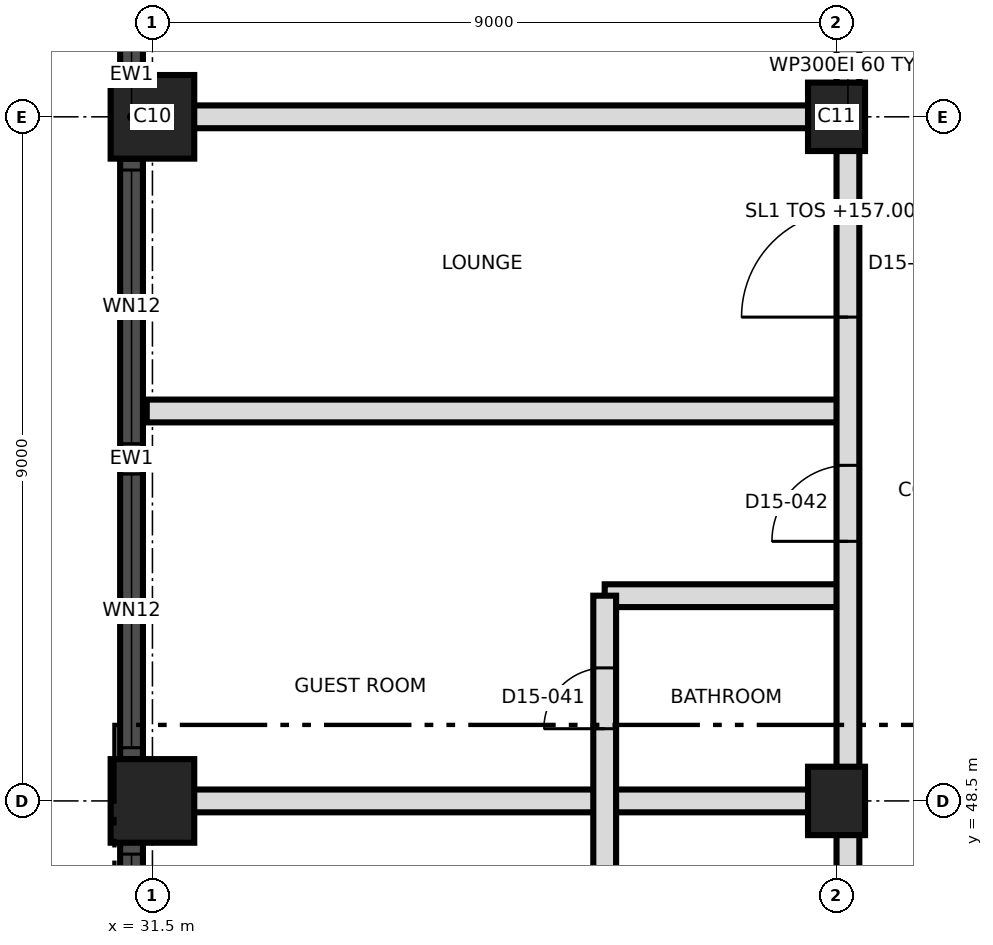
"""IFC4 building model, lengths in metres.
Left out: names, types, materials, properties, quantities, classifications, styles, units other than length and angle.
Written with IfcOpenShell. Run it as: python <this file> out.ifc"""

import sys

from ifc_helpers import new_model, si_unit, direction, frame, frame_2d, origin, origin_2d, place, context, subcontext, project, spatial, rectangle, extrude, element, fill, save


model = new_model("IFC4")
c1 = context("Model", 3, precision=1e-05, world=origin(), true_north=direction((0.0, 1.0)))
c2 = subcontext(c1, "Body", "Model", "MODEL_VIEW")
j1 = project(units=[si_unit("LENGTHUNIT", "METRE"), si_unit("PLANEANGLEUNIT", "RADIAN")], contexts=[c1])
p1 = place(None, origin())
s1 = spatial("IfcSite", under=j1, at=p1, CompositionType="ELEMENT")
p2 = place(p1, origin())
s2 = spatial("IfcBuilding", under=s1, at=p2, CompositionType="ELEMENT")
p3 = place(p2, frame((0.0, 0.0, 157.0)))
s3 = spatial("IfcBuildingStorey", under=s2, at=p3, CompositionType="ELEMENT", Elevation=157.0)
p4 = place(p3, frame((31.5, 48.5, 0.0), z_axis=(0.0, 0.0, 1.0), x_axis=(1.0, 0.0, 0.0)))
e1 = element("IfcColumn", 1, at=p4, inside=s3, PredefinedType="COLUMN", context=c2, shape_type="SweptSolid", body=[
    extrude(rectangle(XDim=1.1, YDim=1.1, at=origin_2d()), origin(), (0.0, 0.0, 1.0), 3.7),
])
p5 = place(p3, frame((40.5, 48.5, 0.0), z_axis=(0.0, 0.0, 1.0), x_axis=(0.0, 1.0, 0.0)))
e2 = element("IfcColumn", 2, at=p5, inside=s3, PredefinedType="COLUMN", context=c2, shape_type="SweptSolid", body=[
    extrude(rectangle(XDim=0.9, YDim=0.75, at=origin_2d()), origin(), (0.0, 0.0, 1.0), 3.7),
])
p6 = place(p3, frame((31.5, 57.5, 0.0), z_axis=(0.0, 0.0, 1.0), x_axis=(1.0, 0.0, 0.0)))
e3 = element("IfcColumn", 3, at=p6, inside=s3, PredefinedType="COLUMN", context=c2, shape_type="SweptSolid", body=[
    extrude(rectangle(XDim=1.1, YDim=1.1, at=origin_2d()), origin(), (0.0, 0.0, 1.0), 3.7),
])
p7 = place(p3, frame((40.5, 57.5, 0.0), z_axis=(0.0, 0.0, 1.0), x_axis=(0.0, 1.0, 0.0)))
e4 = element("IfcColumn", 4, at=p7, inside=s3, PredefinedType="COLUMN", context=c2, shape_type="SweptSolid", body=[
    extrude(rectangle(XDim=0.9, YDim=0.75, at=origin_2d()), origin(), (0.0, 0.0, 1.0), 3.7),
])
p8 = place(p3, frame((31.225, 65.95, 0.0), z_axis=(0.0, 0.0, 1.0), x_axis=(0.0, -1.0, 0.0)))
e5 = element("IfcWall", 5, at=p8, inside=s3, PredefinedType="SOLIDWALL", context=c2, shape_type="SweptSolid", body=[
    extrude(rectangle(XDim=7.9, YDim=0.3, at=frame_2d((3.95, 0.0))), origin(), (0.0, 0.0, 1.0), 2.8),
])
p9 = place(p8, frame((4.15, 0.0, 0.9)))
e6 = element("IfcOpeningElement", 6, at=p9, cuts=e5, PredefinedType="OPENING", context=c2, shape_type="SweptSolid", body=[
    extrude(rectangle(XDim=3.6, YDim=1.5, at=frame_2d((1.8, 0.75))), frame((0.0, 0.16, 0.0), z_axis=(0.0, -1.0, 0.0), x_axis=(1.0, 0.0, 0.0)), (0.0, 0.0, 1.0), 0.32),
])
p10 = place(p3, frame((31.225, 58.05, 0.0), z_axis=(0.0, 0.0, 1.0), x_axis=(0.0, -1.0, 0.0)))
e7 = element("IfcWall", 7, at=p10, inside=s3, PredefinedType="SOLIDWALL", context=c2, shape_type="SweptSolid", body=[
    extrude(rectangle(XDim=1.1, YDim=0.3, at=frame_2d((0.55, 0.0))), origin(), (0.0, 0.0, 1.0), 3.4),
])
p11 = place(p3, frame((31.225, 56.95, 0.0), z_axis=(0.0, 0.0, 1.0), x_axis=(0.0, -1.0, 0.0)))
e8 = element("IfcWall", 8, at=p11, inside=s3, PredefinedType="SOLIDWALL", context=c2, shape_type="SweptSolid", body=[
    extrude(rectangle(XDim=7.9, YDim=0.3, at=frame_2d((3.95, 0.0))), origin(), (0.0, 0.0, 1.0), 2.8),
])
p12 = place(p11, frame((0.15, 0.0, 0.9)))
e9 = element("IfcOpeningElement", 9, at=p12, cuts=e8, PredefinedType="OPENING", context=c2, shape_type="SweptSolid", body=[
    extrude(rectangle(XDim=3.6, YDim=1.5, at=frame_2d((1.8, 0.75))), frame((0.0, 0.16, 0.0), z_axis=(0.0, -1.0, 0.0), x_axis=(1.0, 0.0, 0.0)), (0.0, 0.0, 1.0), 0.32),
])
p13 = place(p11, frame((4.15, 0.0, 0.9)))
e10 = element("IfcOpeningElement", 10, at=p13, cuts=e8, PredefinedType="OPENING", context=c2, shape_type="SweptSolid", body=[
    extrude(rectangle(XDim=3.6, YDim=1.5, at=frame_2d((1.8, 0.75))), frame((0.0, 0.16, 0.0), z_axis=(0.0, -1.0, 0.0), x_axis=(1.0, 0.0, 0.0)), (0.0, 0.0, 1.0), 0.32),
])
p14 = place(p3, frame((31.225, 49.05, 0.0), z_axis=(0.0, 0.0, 1.0), x_axis=(0.0, -1.0, 0.0)))
e11 = element("IfcWall", 11, at=p14, inside=s3, PredefinedType="SOLIDWALL", context=c2, shape_type="SweptSolid", body=[
    extrude(rectangle(XDim=8.87, YDim=0.3, at=frame_2d((4.435, 0.0))), origin(), (0.0, 0.0, 1.0), 3.4),
])
p15 = place(p14, frame((1.25, 0.0, 0.9)))
e12 = element("IfcOpeningElement", 12, at=p15, cuts=e11, PredefinedType="OPENING", context=c2, shape_type="SweptSolid", body=[
    extrude(rectangle(XDim=3.6, YDim=1.5, at=frame_2d((1.8, 0.75))), frame((0.0, 0.16, 0.0), z_axis=(0.0, -1.0, 0.0), x_axis=(1.0, 0.0, 0.0)), (0.0, 0.0, 1.0), 0.32),
])
p16 = place(p14, frame((6.06, 0.0, 0.3)))
e13 = element("IfcOpeningElement", 13, at=p16, cuts=e11, PredefinedType="OPENING", context=c2, shape_type="SweptSolid", body=[
    extrude(rectangle(XDim=1.8, YDim=2.4, at=frame_2d((0.9, 1.2))), frame((0.0, 0.16, 0.0), z_axis=(0.0, -1.0, 0.0), x_axis=(1.0, 0.0, 0.0)), (0.0, 0.0, 1.0), 0.32),
])
p17 = place(p3, frame((31.425, 48.5, 0.0), z_axis=(0.0, 0.0, 1.0), x_axis=(1.0, 0.0, 0.0)))
e14 = element("IfcWall", 14, at=p17, inside=s3, PredefinedType="PARTITIONING", context=c2, shape_type="SweptSolid", body=[
    extrude(rectangle(XDim=9.225, YDim=0.3, at=frame_2d((4.612, 0.0))), origin(), (0.0, 0.0, 1.0), 3.4),
])
p18 = place(p3, frame((37.45, 51.2, 0.0), z_axis=(0.0, 0.0, 1.0), x_axis=(1.0, 0.0, 0.0)))
e15 = element("IfcWall", 15, at=p18, inside=s3, PredefinedType="PARTITIONING", context=c2, shape_type="SweptSolid", body=[
    extrude(rectangle(XDim=3.2, YDim=0.3, at=frame_2d((1.6, 0.0))), origin(), (0.0, 0.0, 1.0), 3.4),
])
for number, where, z_axis, x_axis in (
    (16, (31.425, 53.63, 0.0), (0.0, 0.0, 1.0), (1.0, 0.0, 0.0)),
    (17, (31.425, 57.5, 0.0), (0.0, 0.0, 1.0), (1.0, 0.0, 0.0)),
):
    element("IfcWall", number, at=place(p3, frame(where, z_axis=z_axis, x_axis=x_axis)), inside=s3, PredefinedType="PARTITIONING", context=c2, shape_type="SweptSolid", body=[
        extrude(rectangle(XDim=9.225, YDim=0.3, at=frame_2d((4.612, 0.0))), origin(), (0.0, 0.0, 1.0), 3.4),
    ])
p19 = place(p3, frame((37.45, 45.8, 0.0), z_axis=(0.0, 0.0, 1.0), x_axis=(0.0, 1.0, 0.0)))
e18 = element("IfcWall", 18, at=p19, inside=s3, PredefinedType="PARTITIONING", context=c2, shape_type="SweptSolid", body=[
    extrude(rectangle(XDim=5.4, YDim=0.3, at=frame_2d((2.7, 0.0))), origin(), (0.0, 0.0, 1.0), 3.4),
])
p20 = place(p19, frame((0.95, 0.0, 0.0)))
e19 = element("IfcOpeningElement", 19, at=p20, cuts=e18, PredefinedType="OPENING", context=c2, shape_type="SweptSolid", body=[
    extrude(rectangle(XDim=0.8, YDim=2.1, at=frame_2d((0.4, 1.05))), frame((0.0, 0.16, 0.0), z_axis=(0.0, -1.0, 0.0), x_axis=(1.0, 0.0, 0.0)), (0.0, 0.0, 1.0), 0.32),
])
p21 = place(p19, frame((3.65, 0.0, 0.0)))
e20 = element("IfcOpeningElement", 20, at=p21, cuts=e18, PredefinedType="OPENING", context=c2, shape_type="SweptSolid", body=[
    extrude(rectangle(XDim=0.8, YDim=2.1, at=frame_2d((0.4, 1.05))), frame((0.0, 0.16, 0.0), z_axis=(0.0, -1.0, 0.0), x_axis=(1.0, 0.0, 0.0)), (0.0, 0.0, 1.0), 0.32),
])
p22 = place(p3, frame((40.65, 39.65, 0.0), z_axis=(0.0, 0.0, 1.0), x_axis=(0.0, 1.0, 0.0)))
e21 = element("IfcWall", 21, at=p22, inside=s3, PredefinedType="PARTITIONING", context=c2, shape_type="SweptSolid", body=[
    extrude(rectangle(XDim=35.925, YDim=0.3, at=frame_2d((17.962, 0.0))), origin(), (0.0, 0.0, 1.0), 3.4),
])
p23 = place(p22, frame((1.55, 0.0, 0.0)))
e22 = element("IfcOpeningElement", 22, at=p23, cuts=e21, PredefinedType="OPENING", context=c2, shape_type="SweptSolid", body=[
    extrude(rectangle(XDim=1.2, YDim=2.1, at=frame_2d((0.6, 1.05))), frame((0.0, 0.16, 0.0), z_axis=(0.0, -1.0, 0.0), x_axis=(1.0, 0.0, 0.0)), (0.0, 0.0, 1.0), 0.32),
])
p24 = place(p22, frame((4.8, 0.0, 0.0)))
e23 = element("IfcOpeningElement", 23, at=p24, cuts=e21, PredefinedType="OPENING", context=c2, shape_type="SweptSolid", body=[
    extrude(rectangle(XDim=1.0, YDim=2.1, at=frame_2d((0.5, 1.05))), frame((0.0, 0.16, 0.0), z_axis=(0.0, -1.0, 0.0), x_axis=(1.0, 0.0, 0.0)), (0.0, 0.0, 1.0), 0.32),
])
p25 = place(p22, frame((12.265, 0.0, 0.0)))
e24 = element("IfcOpeningElement", 24, at=p25, cuts=e21, PredefinedType="OPENING", context=c2, shape_type="SweptSolid", body=[
    extrude(rectangle(XDim=1.0, YDim=2.1, at=frame_2d((0.5, 1.05))), frame((0.0, 0.16, 0.0), z_axis=(0.0, -1.0, 0.0), x_axis=(1.0, 0.0, 0.0)), (0.0, 0.0, 1.0), 0.32),
])
p26 = place(p22, frame((15.215, 0.0, 0.0)))
e25 = element("IfcOpeningElement", 25, at=p26, cuts=e21, PredefinedType="OPENING", context=c2, shape_type="SweptSolid", body=[
    extrude(rectangle(XDim=1.4, YDim=2.1, at=frame_2d((0.7, 1.05))), frame((0.0, 0.16, 0.0), z_axis=(0.0, -1.0, 0.0), x_axis=(1.0, 0.0, 0.0)), (0.0, 0.0, 1.0), 0.32),
])
p27 = place(p22, frame((21.35, 0.0, 0.0)))
e26 = element("IfcOpeningElement", 26, at=p27, cuts=e21, PredefinedType="OPENING", context=c2, shape_type="SweptSolid", body=[
    extrude(rectangle(XDim=1.0, YDim=2.4, at=frame_2d((0.5, 1.2))), frame((0.0, 0.16, 0.0), z_axis=(0.0, -1.0, 0.0), x_axis=(1.0, 0.0, 0.0)), (0.0, 0.0, 1.0), 0.32),
])
p28 = place(p9, origin())
e27 = element("IfcWindow", 27, at=p28, inside=s3, PartitioningType="SINGLE_PANEL", PredefinedType="WINDOW", context=c2, shape_type="SweptSolid", body=[
    extrude(rectangle(XDim=3.6, YDim=1.5, at=frame_2d((1.8, 0.75))), frame((0.0, 0.03, 0.0), z_axis=(0.0, -1.0, 0.0), x_axis=(1.0, 0.0, 0.0)), (0.0, 0.0, 1.0), 0.06),
])
fill(e6, e27)
p29 = place(p12, origin())
e28 = element("IfcWindow", 28, at=p29, inside=s3, PartitioningType="SINGLE_PANEL", PredefinedType="WINDOW", context=c2, shape_type="SweptSolid", body=[
    extrude(rectangle(XDim=3.6, YDim=1.5, at=frame_2d((1.8, 0.75))), frame((0.0, 0.03, 0.0), z_axis=(0.0, -1.0, 0.0), x_axis=(1.0, 0.0, 0.0)), (0.0, 0.0, 1.0), 0.06),
])
fill(e9, e28)
p30 = place(p13, origin())
e29 = element("IfcWindow", 29, at=p30, inside=s3, PartitioningType="SINGLE_PANEL", PredefinedType="WINDOW", context=c2, shape_type="SweptSolid", body=[
    extrude(rectangle(XDim=3.6, YDim=1.5, at=frame_2d((1.8, 0.75))), frame((0.0, 0.03, 0.0), z_axis=(0.0, -1.0, 0.0), x_axis=(1.0, 0.0, 0.0)), (0.0, 0.0, 1.0), 0.06),
])
fill(e10, e29)
p31 = place(p15, origin())
e30 = element("IfcWindow", 30, at=p31, inside=s3, PartitioningType="SINGLE_PANEL", PredefinedType="WINDOW", context=c2, shape_type="SweptSolid", body=[
    extrude(rectangle(XDim=3.6, YDim=1.5, at=frame_2d((1.8, 0.75))), frame((0.0, 0.03, 0.0), z_axis=(0.0, -1.0, 0.0), x_axis=(1.0, 0.0, 0.0)), (0.0, 0.0, 1.0), 0.06),
])
fill(e12, e30)
p32 = place(p21, origin())
e31 = element("IfcDoor", 31, at=p32, inside=s3, OperationType="SINGLE_SWING_LEFT", PredefinedType="DOOR", context=c2, shape_type="SweptSolid", body=[
    extrude(rectangle(XDim=0.8, YDim=2.1, at=frame_2d((0.4, 1.05))), frame((0.0, 0.025, 0.0), z_axis=(0.0, -1.0, 0.0), x_axis=(1.0, 0.0, 0.0)), (0.0, 0.0, 1.0), 0.05),
])
fill(e20, e31)
p33 = place(p25, origin())
e32 = element("IfcDoor", 32, at=p33, inside=s3, OperationType="SINGLE_SWING_LEFT", PredefinedType="DOOR", context=c2, shape_type="SweptSolid", body=[
    extrude(rectangle(XDim=1.0, YDim=2.1, at=frame_2d((0.5, 1.05))), frame((0.0, 0.025, 0.0), z_axis=(0.0, -1.0, 0.0), x_axis=(1.0, 0.0, 0.0)), (0.0, 0.0, 1.0), 0.05),
])
fill(e24, e32)
p34 = place(p26, origin())
e33 = element("IfcDoor", 33, at=p34, inside=s3, OperationType="SINGLE_SWING_RIGHT", PredefinedType="DOOR", context=c2, shape_type="SweptSolid", body=[
    extrude(rectangle(XDim=1.4, YDim=2.1, at=frame_2d((0.7, 1.05))), frame((0.0, 0.025, 0.0), z_axis=(0.0, -1.0, 0.0), x_axis=(1.0, 0.0, 0.0)), (0.0, 0.0, 1.0), 0.05),
])
fill(e25, e33)
save(model, sys.argv[1])
